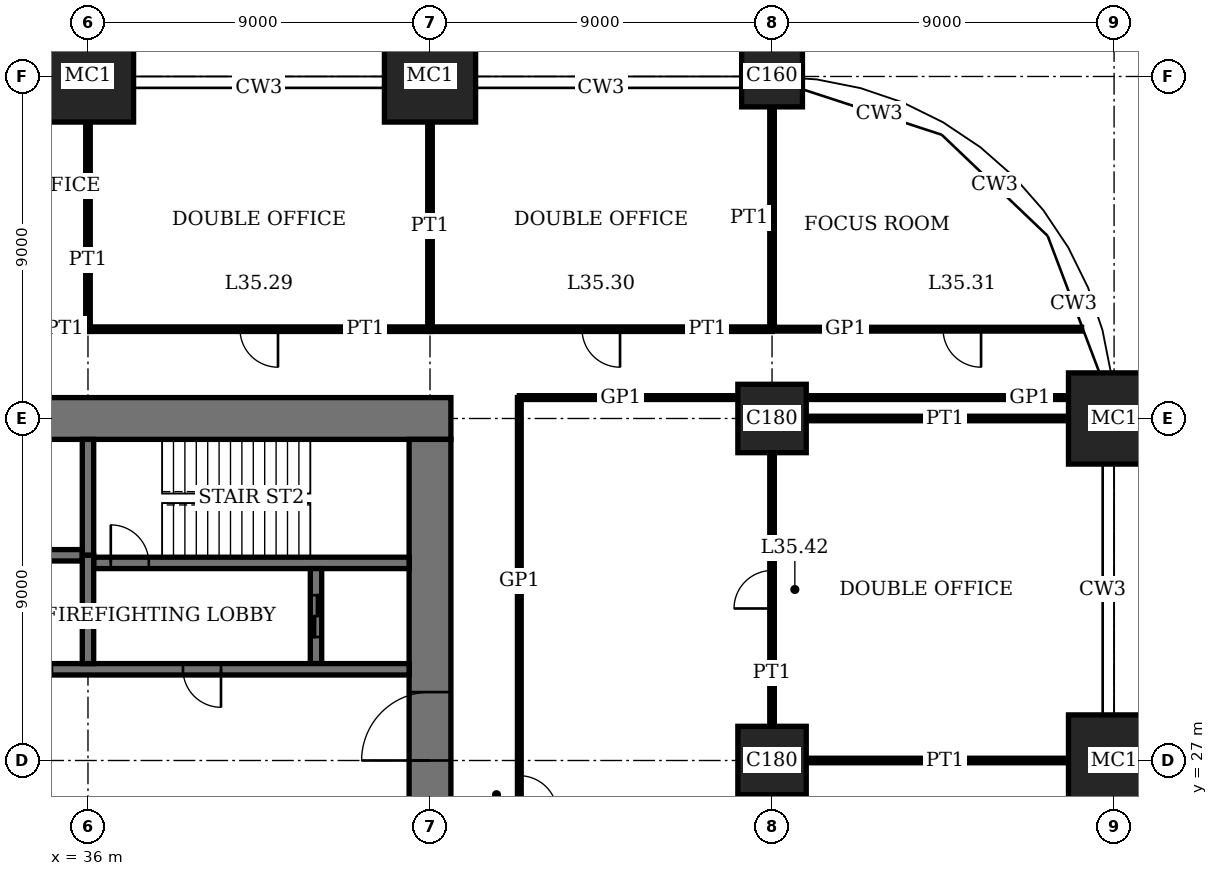
"""IFC4 building model, lengths in metres.
Left out: names, types, materials, properties, quantities, classifications, styles, units other than length and angle.
Written with IfcOpenShell. Run it as: python <this file> out.ifc"""

import sys

from ifc_helpers import new_model, si_unit, direction, frame, frame_2d, origin, origin_2d, place, context, subcontext, project, spatial, rectangle, extrude, element, fill, save


model = new_model("IFC4")
c1 = context("Model", 3, precision=1e-05, world=origin(), true_north=direction((0.0, 1.0)))
c2 = subcontext(c1, "Body", "Model", "MODEL_VIEW")
j1 = project(units=[si_unit("LENGTHUNIT", "METRE"), si_unit("PLANEANGLEUNIT", "RADIAN")], contexts=[c1])
p1 = place(None, origin())
s1 = spatial("IfcSite", under=j1, at=p1, CompositionType="ELEMENT")
p2 = place(p1, origin())
s2 = spatial("IfcBuilding", under=s1, at=p2, CompositionType="ELEMENT")
p3 = place(p2, frame((0.0, 0.0, 145.0)))
s3 = spatial("IfcBuildingStorey", under=s2, at=p3, CompositionType="ELEMENT", Elevation=145.0)
for number, where, z_axis, x_axis in (
    (1, (36.0, 45.0, 0.0), (0.0, 0.0, 1.0), (1.0, 0.0, 0.0)),
    (2, (45.0, 45.0, 0.0), (0.0, 0.0, 1.0), (1.0, 0.0, 0.0)),
):
    element("IfcColumn", number, at=place(p3, frame(where, z_axis=z_axis, x_axis=x_axis)), inside=s3, PredefinedType="COLUMN", context=c2, shape_type="SweptSolid", body=[
        extrude(rectangle(XDim=2.4, YDim=2.4, at=origin_2d()), origin(), (0.0, 0.0, 1.0), 4.0),
    ])
for number, where, z_axis, x_axis in (
    (3, (54.0, 27.0, 0.0), (0.0, 0.0, 1.0), (1.0, 0.0, 0.0)),
    (4, (54.0, 36.0, 0.0), (0.0, 0.0, 1.0), (1.0, 0.0, 0.0)),
):
    element("IfcColumn", number, at=place(p3, frame(where, z_axis=z_axis, x_axis=x_axis)), inside=s3, PredefinedType="COLUMN", context=c2, shape_type="SweptSolid", body=[
        extrude(rectangle(XDim=1.8, YDim=1.8, at=origin_2d()), origin(), (0.0, 0.0, 1.0), 4.0),
    ])
p4 = place(p3, frame((54.0, 45.0, 0.0), z_axis=(0.0, 0.0, 1.0), x_axis=(1.0, 0.0, 0.0)))
e5 = element("IfcColumn", 5, at=p4, inside=s3, PredefinedType="COLUMN", context=c2, shape_type="SweptSolid", body=[
    extrude(rectangle(XDim=1.6, YDim=1.6, at=origin_2d()), origin(), (0.0, 0.0, 1.0), 4.0),
])
for number, where, z_axis, x_axis in (
    (6, (63.0, 27.0, 0.0), (0.0, 0.0, 1.0), (1.0, 0.0, 0.0)),
    (7, (63.0, 36.0, 0.0), (0.0, 0.0, 1.0), (1.0, 0.0, 0.0)),
):
    element("IfcColumn", number, at=place(p3, frame(where, z_axis=z_axis, x_axis=x_axis)), inside=s3, PredefinedType="COLUMN", context=c2, shape_type="SweptSolid", body=[
        extrude(rectangle(XDim=2.4, YDim=2.4, at=origin_2d()), origin(), (0.0, 0.0, 1.0), 4.0),
    ])
p5 = place(p3, frame((45.55, 36.0, 0.0), z_axis=(0.0, 0.0, 1.0), x_axis=(-1.0, 0.0, 0.0)))
e8 = element("IfcWall", 8, at=p5, inside=s3, PredefinedType="SHEAR", context=c2, shape_type="SweptSolid", body=[
    extrude(rectangle(XDim=28.1, YDim=1.1, at=frame_2d((14.05, 0.0))), origin(), (0.0, 0.0, 1.0), 4.0),
])
p6 = place(p5, frame((11.55, 0.0, 0.0)))
e9 = element("IfcOpeningElement", 9, at=p6, cuts=e8, PredefinedType="OPENING", context=c2, shape_type="SweptSolid", body=[
    extrude(rectangle(XDim=1.0, YDim=2.4, at=frame_2d((0.5, 1.2))), frame((0.0, 0.56, 0.0), z_axis=(0.0, -1.0, 0.0), x_axis=(1.0, 0.0, 0.0)), (0.0, 0.0, 1.0), 1.12),
])
p7 = place(p5, frame((16.55, 0.0, 0.0)))
e10 = element("IfcOpeningElement", 10, at=p7, cuts=e8, PredefinedType="OPENING", context=c2, shape_type="SweptSolid", body=[
    extrude(rectangle(XDim=1.0, YDim=2.4, at=frame_2d((0.5, 1.2))), frame((0.0, 0.56, 0.0), z_axis=(0.0, -1.0, 0.0), x_axis=(1.0, 0.0, 0.0)), (0.0, 0.0, 1.0), 1.12),
])
p8 = place(p5, frame((20.0, 0.0, 0.0)))
e11 = element("IfcOpeningElement", 11, at=p8, cuts=e8, PredefinedType="OPENING", context=c2, shape_type="SweptSolid", body=[
    extrude(rectangle(XDim=1.1, YDim=2.4, at=frame_2d((0.55, 1.2))), frame((0.0, 0.56, 0.0), z_axis=(0.0, -1.0, 0.0), x_axis=(1.0, 0.0, 0.0)), (0.0, 0.0, 1.0), 1.12),
])
p9 = place(p5, frame((24.05, 0.0, 0.0)))
e12 = element("IfcOpeningElement", 12, at=p9, cuts=e8, PredefinedType="OPENING", context=c2, shape_type="SweptSolid", body=[
    extrude(rectangle(XDim=1.0, YDim=2.4, at=frame_2d((0.5, 1.2))), frame((0.0, 0.56, 0.0), z_axis=(0.0, -1.0, 0.0), x_axis=(1.0, 0.0, 0.0)), (0.0, 0.0, 1.0), 1.12),
])
p10 = place(p3, frame((45.0, 18.55, 0.0), z_axis=(0.0, 0.0, 1.0), x_axis=(0.0, 1.0, 0.0)))
e13 = element("IfcWall", 13, at=p10, inside=s3, PredefinedType="SHEAR", context=c2, shape_type="SweptSolid", body=[
    extrude(rectangle(XDim=16.9, YDim=1.1, at=frame_2d((8.45, 0.0))), origin(), (0.0, 0.0, 1.0), 4.0),
])
p11 = place(p10, frame((8.45, 0.0, 0.0)))
e14 = element("IfcOpeningElement", 14, at=p11, cuts=e13, PredefinedType="OPENING", context=c2, shape_type="SweptSolid", body=[
    extrude(rectangle(XDim=1.8, YDim=2.4, at=frame_2d((0.9, 1.2))), frame((0.0, 0.56, 0.0), z_axis=(0.0, -1.0, 0.0), x_axis=(1.0, 0.0, 0.0)), (0.0, 0.0, 1.0), 1.12),
])
p12 = place(p3, frame((36.15, 32.2, 0.0), z_axis=(0.0, 0.0, 1.0), x_axis=(1.0, 0.0, 0.0)))
e15 = element("IfcWall", 15, at=p12, inside=s3, PredefinedType="SHEAR", context=c2, shape_type="SweptSolid", body=[
    extrude(rectangle(XDim=8.3, YDim=0.3, at=frame_2d((4.15, 0.0))), origin(), (0.0, 0.0, 1.0), 4.0),
])
p13 = place(p12, frame((0.45, 0.0, 0.0)))
e16 = element("IfcOpeningElement", 16, at=p13, cuts=e15, PredefinedType="OPENING", context=c2, shape_type="SweptSolid", body=[
    extrude(rectangle(XDim=1.0, YDim=2.4, at=frame_2d((0.5, 1.2))), frame((0.0, 0.16, 0.0), z_axis=(0.0, -1.0, 0.0), x_axis=(1.0, 0.0, 0.0)), (0.0, 0.0, 1.0), 0.32),
])
p14 = place(p3, frame((36.0, 32.4, 0.0), z_axis=(0.0, 0.0, 1.0), x_axis=(0.0, 1.0, 0.0)))
e17 = element("IfcWall", 17, at=p14, inside=s3, PredefinedType="SHEAR", context=c2, shape_type="SweptSolid", body=[
    extrude(rectangle(XDim=3.05, YDim=0.3, at=frame_2d((1.525, 0.0))), origin(), (0.0, 0.0, 1.0), 4.0),
])
p15 = place(p3, frame((42.0, 29.55, 0.0), z_axis=(0.0, 0.0, 1.0), x_axis=(0.0, 1.0, 0.0)))
e18 = element("IfcWall", 18, at=p15, inside=s3, PredefinedType="SHEAR", context=c2, shape_type="SweptSolid", body=[
    extrude(rectangle(XDim=2.5, YDim=0.3, at=frame_2d((1.25, 0.0))), origin(), (0.0, 0.0, 1.0), 4.0),
])
p16 = place(p15, frame((0.7, 0.0, 0.0)))
e19 = element("IfcOpeningElement", 19, at=p16, cuts=e18, PredefinedType="OPENING", context=c2, shape_type="SweptSolid", body=[
    extrude(rectangle(XDim=1.1, YDim=2.4, at=frame_2d((0.55, 1.2))), frame((0.0, 0.16, 0.0), z_axis=(0.0, -1.0, 0.0), x_axis=(1.0, 0.0, 0.0)), (0.0, 0.0, 1.0), 0.32),
])
p17 = place(p3, frame((18.55, 29.4, 0.0), z_axis=(0.0, 0.0, 1.0), x_axis=(1.0, 0.0, 0.0)))
e20 = element("IfcWall", 20, at=p17, inside=s3, PredefinedType="SHEAR", context=c2, shape_type="SweptSolid", body=[
    extrude(rectangle(XDim=25.9, YDim=0.3, at=frame_2d((12.95, 0.0))), origin(), (0.0, 0.0, 1.0), 4.0),
])
p18 = place(p17, frame((19.95, 0.0, 0.0)))
e21 = element("IfcOpeningElement", 21, at=p18, cuts=e20, PredefinedType="OPENING", context=c2, shape_type="SweptSolid", body=[
    extrude(rectangle(XDim=1.0, YDim=2.4, at=frame_2d((0.5, 1.2))), frame((0.0, 0.16, 0.0), z_axis=(0.0, -1.0, 0.0), x_axis=(1.0, 0.0, 0.0)), (0.0, 0.0, 1.0), 0.32),
])
p19 = place(p17, frame((0.5, 0.0, 0.0)))
e22 = element("IfcOpeningElement", 22, at=p19, cuts=e20, PredefinedType="OPENING", context=c2, shape_type="SweptSolid", body=[
    extrude(rectangle(XDim=0.9, YDim=2.1, at=frame_2d((0.45, 1.05))), frame((0.0, 0.16, 0.0), z_axis=(0.0, -1.0, 0.0), x_axis=(1.0, 0.0, 0.0)), (0.0, 0.0, 1.0), 0.32),
])
p20 = place(p17, frame((15.4, 0.0, 0.0)))
e23 = element("IfcOpeningElement", 23, at=p20, cuts=e20, PredefinedType="OPENING", context=c2, shape_type="SweptSolid", body=[
    extrude(rectangle(XDim=1.1, YDim=2.4, at=frame_2d((0.55, 1.2))), frame((0.0, 0.16, 0.0), z_axis=(0.0, -1.0, 0.0), x_axis=(1.0, 0.0, 0.0)), (0.0, 0.0, 1.0), 0.32),
])
p21 = place(p17, frame((12.4, 0.0, 0.0)))
e24 = element("IfcOpeningElement", 24, at=p21, cuts=e20, PredefinedType="OPENING", context=c2, shape_type="SweptSolid", body=[
    extrude(rectangle(XDim=1.1, YDim=2.4, at=frame_2d((0.55, 1.2))), frame((0.0, 0.16, 0.0), z_axis=(0.0, -1.0, 0.0), x_axis=(1.0, 0.0, 0.0)), (0.0, 0.0, 1.0), 0.32),
])
p22 = place(p17, frame((3.3, 0.0, 0.0)))
e25 = element("IfcOpeningElement", 25, at=p22, cuts=e20, PredefinedType="OPENING", context=c2, shape_type="SweptSolid", body=[
    extrude(rectangle(XDim=1.3, YDim=2.4, at=frame_2d((0.65, 1.2))), frame((0.0, 0.16, 0.0), z_axis=(0.0, -1.0, 0.0), x_axis=(1.0, 0.0, 0.0)), (0.0, 0.0, 1.0), 0.32),
])
p23 = place(p3, frame((18.55, 32.4, 0.0), z_axis=(0.0, 0.0, 1.0), x_axis=(1.0, 0.0, 0.0)))
e26 = element("IfcWall", 26, at=p23, inside=s3, PredefinedType="SHEAR", context=c2, shape_type="SweptSolid", body=[
    extrude(rectangle(XDim=17.3, YDim=0.3, at=frame_2d((8.65, 0.0))), origin(), (0.0, 0.0, 1.0), 4.0),
])
p24 = place(p3, frame((36.0, 29.55, 0.0), z_axis=(0.0, 0.0, 1.0), x_axis=(0.0, 1.0, 0.0)))
e27 = element("IfcWall", 27, at=p24, inside=s3, PredefinedType="SHEAR", context=c2, shape_type="SweptSolid", body=[
    extrude(rectangle(XDim=2.85, YDim=0.3, at=frame_2d((1.425, 0.0))), origin(), (0.0, 0.0, 1.0), 4.0),
])
for number, where, z_axis, x_axis in (
    (28, (54.9, 27.0, 0.0), (0.0, 0.0, 1.0), (1.0, 0.0, 0.0)),
    (29, (54.9, 36.0, 0.0), (0.0, 0.0, 1.0), (1.0, 0.0, 0.0)),
):
    element("IfcWall", number, at=place(p3, frame(where, z_axis=z_axis, x_axis=x_axis)), inside=s3, PredefinedType="PARTITIONING", context=c2, shape_type="SweptSolid", body=[
        extrude(rectangle(XDim=6.9, YDim=0.12, at=frame_2d((3.45, 0.0))), origin(), (0.0, 0.0, 1.0), 3.05),
    ])
p25 = place(p3, frame((47.35, 36.55, 0.0), z_axis=(0.0, 0.0, 1.0), x_axis=(1.0, 0.0, 0.0)))
e30 = element("IfcWall", 30, at=p25, inside=s3, PredefinedType="PARTITIONING", context=c2, shape_type="SweptSolid", body=[
    extrude(rectangle(XDim=5.75, YDim=0.1, at=frame_2d((2.875, 0.0))), origin(), (0.0, 0.0, 1.0), 3.05),
])
p26 = place(p3, frame((54.9, 36.55, 0.0), z_axis=(0.0, 0.0, 1.0), x_axis=(1.0, 0.0, 0.0)))
e31 = element("IfcWall", 31, at=p26, inside=s3, PredefinedType="PARTITIONING", context=c2, shape_type="SweptSolid", body=[
    extrude(rectangle(XDim=6.9, YDim=0.1, at=frame_2d((3.45, 0.0))), origin(), (0.0, 0.0, 1.0), 3.05),
])
p27 = place(p3, frame((31.5, 38.35, 0.0), z_axis=(0.0, 0.0, 1.0), x_axis=(1.0, 0.0, 0.0)))
e32 = element("IfcWall", 32, at=p27, inside=s3, PredefinedType="PARTITIONING", context=c2, shape_type="SweptSolid", body=[
    extrude(rectangle(XDim=4.5, YDim=0.12, at=frame_2d((2.25, 0.0))), origin(), (0.0, 0.0, 1.0), 3.75),
])
p28 = place(p27, frame((1.75, 0.0, 0.0)))
e33 = element("IfcOpeningElement", 33, at=p28, cuts=e32, PredefinedType="OPENING", context=c2, shape_type="SweptSolid", body=[
    extrude(rectangle(XDim=1.0, YDim=2.4, at=frame_2d((0.5, 1.2))), frame((0.0, 0.07, 0.0), z_axis=(0.0, -1.0, 0.0), x_axis=(1.0, 0.0, 0.0)), (0.0, 0.0, 1.0), 0.14),
])
p29 = place(p3, frame((36.0, 38.35, 0.0), z_axis=(0.0, 0.0, 1.0), x_axis=(1.0, 0.0, 0.0)))
e34 = element("IfcWall", 34, at=p29, inside=s3, PredefinedType="PARTITIONING", context=c2, shape_type="SweptSolid", body=[
    extrude(rectangle(XDim=9.0, YDim=0.12, at=frame_2d((4.5, 0.0))), origin(), (0.0, 0.0, 1.0), 3.75),
])
p30 = place(p29, frame((4.0, 0.0, 0.0)))
e35 = element("IfcOpeningElement", 35, at=p30, cuts=e34, PredefinedType="OPENING", context=c2, shape_type="SweptSolid", body=[
    extrude(rectangle(XDim=1.0, YDim=2.4, at=frame_2d((0.5, 1.2))), frame((0.0, 0.07, 0.0), z_axis=(0.0, -1.0, 0.0), x_axis=(1.0, 0.0, 0.0)), (0.0, 0.0, 1.0), 0.14),
])
p31 = place(p3, frame((45.0, 38.35, 0.0), z_axis=(0.0, 0.0, 1.0), x_axis=(1.0, 0.0, 0.0)))
e36 = element("IfcWall", 36, at=p31, inside=s3, PredefinedType="PARTITIONING", context=c2, shape_type="SweptSolid", body=[
    extrude(rectangle(XDim=9.0, YDim=0.12, at=frame_2d((4.5, 0.0))), origin(), (0.0, 0.0, 1.0), 3.75),
])
p32 = place(p31, frame((4.0, 0.0, 0.0)))
e37 = element("IfcOpeningElement", 37, at=p32, cuts=e36, PredefinedType="OPENING", context=c2, shape_type="SweptSolid", body=[
    extrude(rectangle(XDim=1.0, YDim=2.4, at=frame_2d((0.5, 1.2))), frame((0.0, 0.07, 0.0), z_axis=(0.0, -1.0, 0.0), x_axis=(1.0, 0.0, 0.0)), (0.0, 0.0, 1.0), 0.14),
])
p33 = place(p3, frame((54.0, 38.35, 0.0), z_axis=(0.0, 0.0, 1.0), x_axis=(1.0, 0.0, 0.0)))
e38 = element("IfcWall", 38, at=p33, inside=s3, PredefinedType="PARTITIONING", context=c2, shape_type="SweptSolid", body=[
    extrude(rectangle(XDim=8.146, YDim=0.1, at=frame_2d((4.073, 0.0))), origin(), (0.0, 0.0, 1.0), 3.75),
])
p34 = place(p33, frame((4.5, 0.0, 0.0)))
e39 = element("IfcOpeningElement", 39, at=p34, cuts=e38, PredefinedType="OPENING", context=c2, shape_type="SweptSolid", body=[
    extrude(rectangle(XDim=1.0, YDim=2.4, at=frame_2d((0.5, 1.2))), frame((0.0, 0.06, 0.0), z_axis=(0.0, -1.0, 0.0), x_axis=(1.0, 0.0, 0.0)), (0.0, 0.0, 1.0), 0.12),
])
for number, where, z_axis, x_axis in (
    (40, (36.0, 38.35, 0.0), (0.0, 0.0, 1.0), (0.0, 1.0, 0.0)),
    (41, (45.0, 38.35, 0.0), (0.0, 0.0, 1.0), (0.0, 1.0, 0.0)),
):
    element("IfcWall", number, at=place(p3, frame(where, z_axis=z_axis, x_axis=x_axis)), inside=s3, PredefinedType="PARTITIONING", context=c2, shape_type="SweptSolid", body=[
        extrude(rectangle(XDim=5.45, YDim=0.12, at=frame_2d((2.725, 0.0))), origin(), (0.0, 0.0, 1.0), 3.05),
    ])
p35 = place(p3, frame((47.35, 15.65, 0.0), z_axis=(0.0, 0.0, 1.0), x_axis=(0.0, 1.0, 0.0)))
e42 = element("IfcWall", 42, at=p35, inside=s3, PredefinedType="PARTITIONING", context=c2, shape_type="SweptSolid", body=[
    extrude(rectangle(XDim=20.9, YDim=0.1, at=frame_2d((10.45, 0.0))), origin(), (0.0, 0.0, 1.0), 3.75),
])
p36 = place(p35, frame((9.95, 0.0, 0.0)))
e43 = element("IfcOpeningElement", 43, at=p36, cuts=e42, PredefinedType="OPENING", context=c2, shape_type="SweptSolid", body=[
    extrude(rectangle(XDim=1.0, YDim=2.4, at=frame_2d((0.5, 1.2))), frame((0.0, 0.06, 0.0), z_axis=(0.0, -1.0, 0.0), x_axis=(1.0, 0.0, 0.0)), (0.0, 0.0, 1.0), 0.12),
])
p37 = place(p3, frame((54.0, 38.35, 0.0), z_axis=(0.0, 0.0, 1.0), x_axis=(0.0, 1.0, 0.0)))
e44 = element("IfcWall", 44, at=p37, inside=s3, PredefinedType="PARTITIONING", context=c2, shape_type="SweptSolid", body=[
    extrude(rectangle(XDim=5.85, YDim=0.12, at=frame_2d((2.925, 0.0))), origin(), (0.0, 0.0, 1.0), 3.05),
])
p38 = place(p3, frame((54.0, 27.9, 0.0), z_axis=(0.0, 0.0, 1.0), x_axis=(0.0, 1.0, 0.0)))
e45 = element("IfcWall", 45, at=p38, inside=s3, PredefinedType="PARTITIONING", context=c2, shape_type="SweptSolid", body=[
    extrude(rectangle(XDim=7.2, YDim=0.12, at=frame_2d((3.6, 0.0))), origin(), (0.0, 0.0, 1.0), 3.05),
])
p39 = place(p38, frame((3.1, 0.0, 0.0)))
e46 = element("IfcOpeningElement", 46, at=p39, cuts=e45, PredefinedType="OPENING", context=c2, shape_type="SweptSolid", body=[
    extrude(rectangle(XDim=1.0, YDim=2.4, at=frame_2d((0.5, 1.2))), frame((0.0, 0.07, 0.0), z_axis=(0.0, -1.0, 0.0), x_axis=(1.0, 0.0, 0.0)), (0.0, 0.0, 1.0), 0.14),
])
p40 = place(p11, origin())
e47 = element("IfcDoor", 47, at=p40, inside=s3, OperationType="DOUBLE_DOOR_DOUBLE_SWING", PredefinedType="DOOR", context=c2, shape_type="SweptSolid", body=[
    extrude(rectangle(XDim=1.8, YDim=2.4, at=frame_2d((0.9, 1.2))), frame((0.0, 0.03, 0.0), z_axis=(0.0, -1.0, 0.0), x_axis=(1.0, 0.0, 0.0)), (0.0, 0.0, 1.0), 0.06),
    extrude(rectangle(XDim=0.04, YDim=2.4, at=frame_2d((0.02, 1.2))), frame((0.0, 0.55, 0.0), z_axis=(0.0, -1.0, 0.0), x_axis=(1.0, 0.0, 0.0)), (0.0, 0.0, 1.0), 1.1),
    extrude(rectangle(XDim=0.04, YDim=2.4, at=frame_2d((1.78, 1.2))), frame((0.0, 0.55, 0.0), z_axis=(0.0, -1.0, 0.0), x_axis=(1.0, 0.0, 0.0)), (0.0, 0.0, 1.0), 1.1),
    extrude(rectangle(XDim=1.8, YDim=0.04, at=frame_2d((0.9, 2.38))), frame((0.0, 0.55, 0.0), z_axis=(0.0, -1.0, 0.0), x_axis=(1.0, 0.0, 0.0)), (0.0, 0.0, 1.0), 1.1),
])
fill(e14, e47)
p41 = place(p13, origin())
e48 = element("IfcDoor", 48, at=p41, inside=s3, OperationType="SINGLE_SWING_RIGHT", PredefinedType="DOOR", context=c2, shape_type="SweptSolid", body=[
    extrude(rectangle(XDim=1.0, YDim=2.4, at=frame_2d((0.5, 1.2))), frame((0.0, 0.03, 0.0), z_axis=(0.0, -1.0, 0.0), x_axis=(1.0, 0.0, 0.0)), (0.0, 0.0, 1.0), 0.06),
])
fill(e16, e48)
p42 = place(p18, origin())
e49 = element("IfcDoor", 49, at=p42, inside=s3, OperationType="SINGLE_SWING_RIGHT", PredefinedType="DOOR", context=c2, shape_type="SweptSolid", body=[
    extrude(rectangle(XDim=1.0, YDim=2.4, at=frame_2d((0.5, 1.2))), frame((0.0, 0.03, 0.0), z_axis=(0.0, -1.0, 0.0), x_axis=(1.0, 0.0, 0.0)), (0.0, 0.0, 1.0), 0.06),
])
fill(e21, e49)
p43 = place(p30, origin())
e50 = element("IfcDoor", 50, at=p43, inside=s3, OperationType="SINGLE_SWING_RIGHT", PredefinedType="DOOR", context=c2, shape_type="SweptSolid", body=[
    extrude(rectangle(XDim=1.0, YDim=2.4, at=frame_2d((0.5, 1.2))), frame((0.0, 0.025, 0.0), z_axis=(0.0, -1.0, 0.0), x_axis=(1.0, 0.0, 0.0)), (0.0, 0.0, 1.0), 0.05),
])
fill(e35, e50)
p44 = place(p32, origin())
e51 = element("IfcDoor", 51, at=p44, inside=s3, OperationType="SINGLE_SWING_RIGHT", PredefinedType="DOOR", context=c2, shape_type="SweptSolid", body=[
    extrude(rectangle(XDim=1.0, YDim=2.4, at=frame_2d((0.5, 1.2))), frame((0.0, 0.025, 0.0), z_axis=(0.0, -1.0, 0.0), x_axis=(1.0, 0.0, 0.0)), (0.0, 0.0, 1.0), 0.05),
])
fill(e37, e51)
p45 = place(p34, origin())
e52 = element("IfcDoor", 52, at=p45, inside=s3, OperationType="SINGLE_SWING_RIGHT", PredefinedType="DOOR", context=c2, shape_type="SweptSolid", body=[
    extrude(rectangle(XDim=1.0, YDim=2.4, at=frame_2d((0.5, 1.2))), frame((0.0, 0.02, 0.0), z_axis=(0.0, -1.0, 0.0), x_axis=(1.0, 0.0, 0.0)), (0.0, 0.0, 1.0), 0.04),
])
fill(e39, e52)
p46 = place(p36, origin())
e53 = element("IfcDoor", 53, at=p46, inside=s3, OperationType="SINGLE_SWING_LEFT", PredefinedType="DOOR", context=c2, shape_type="SweptSolid", body=[
    extrude(rectangle(XDim=1.0, YDim=2.4, at=frame_2d((0.5, 1.2))), frame((0.0, 0.02, 0.0), z_axis=(0.0, -1.0, 0.0), x_axis=(1.0, 0.0, 0.0)), (0.0, 0.0, 1.0), 0.04),
])
fill(e43, e53)
p47 = place(p39, origin())
e54 = element("IfcDoor", 54, at=p47, inside=s3, OperationType="SINGLE_SWING_RIGHT", PredefinedType="DOOR", context=c2, shape_type="SweptSolid", body=[
    extrude(rectangle(XDim=1.0, YDim=2.4, at=frame_2d((0.5, 1.2))), frame((0.0, 0.025, 0.0), z_axis=(0.0, -1.0, 0.0), x_axis=(1.0, 0.0, 0.0)), (0.0, 0.0, 1.0), 0.05),
])
fill(e46, e54)
p48 = place(p16, origin())
e55 = element("IfcDoor", 55, at=p48, inside=s3, OperationType="DOUBLE_DOOR_SLIDING", PredefinedType="DOOR", context=c2, shape_type="SweptSolid", body=[
    extrude(rectangle(XDim=1.1, YDim=2.4, at=frame_2d((0.55, 1.2))), frame((0.0, 0.03, 0.0), z_axis=(0.0, -1.0, 0.0), x_axis=(1.0, 0.0, 0.0)), (0.0, 0.0, 1.0), 0.06),
])
fill(e19, e55)
save(model, sys.argv[1])
